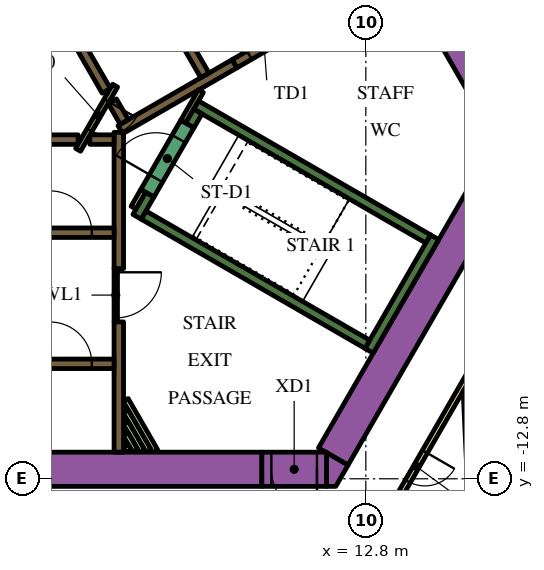
"""IFC4 building model, lengths in metres.
Left out: names, types, materials, properties, quantities, classifications, styles, units other than length and angle.
Written with IfcOpenShell. Run it as: python <this file> out.ifc"""

import sys

from ifc_helpers import new_model, si_unit, direction, frame, frame_2d, origin, place, context, subcontext, project, spatial, polyline, rectangle, outline, extrude, element, fill, save


model = new_model("IFC4")
c1 = context("Model", 3, precision=1e-05, world=origin(), true_north=direction((0.0, 1.0)))
c2 = subcontext(c1, "Body", "Model", "MODEL_VIEW")
j1 = project(units=[si_unit("LENGTHUNIT", "METRE"), si_unit("PLANEANGLEUNIT", "RADIAN")], contexts=[c1])
p1 = place(None, origin())
s1 = spatial("IfcSite", under=j1, at=p1, CompositionType="ELEMENT")
p2 = place(p1, origin())
s2 = spatial("IfcBuilding", under=s1, at=p2, CompositionType="ELEMENT")
p3 = place(p2, frame((0.0, 0.0, 47.1)))
s3 = spatial("IfcBuildingStorey", under=s2, at=p3, CompositionType="ELEMENT", Elevation=47.1)
p4 = place(p3, frame((6.776, 13.364, 0.0), z_axis=(0.0, 0.0, 1.0), x_axis=(0.500004177138, -0.8660229921, 0.0)))
e1 = element("IfcWall", 1, at=p4, inside=s3, PredefinedType="SOLIDWALL", context=c2, shape_type="SweptSolid", body=[
    extrude(rectangle(XDim=20.204, YDim=0.9, at=frame_2d((10.102, 0.0))), origin(), (0.0, 0.0, 1.0), 3.9),
])
p5 = place(p3, frame((11.943, -12.214, 0.0), z_axis=(0.0, 0.0, 1.0), x_axis=(0.49998092645, 0.866036415623, 0.0)))
e2 = element("IfcWall", 2, at=p5, inside=s3, PredefinedType="SOLIDWALL", context=c2, shape_type="SweptSolid", body=[
    extrude(rectangle(XDim=8.83, YDim=0.9, at=frame_2d((4.415, 0.0))), origin(), (0.0, 0.0, 1.0), 3.9),
])
p6 = place(p3, origin())
e3 = element("IfcWall", 3, at=p6, inside=s3, PredefinedType="SOLIDWALL", context=c2, shape_type="SweptSolid", body=[
    extrude(outline(polyline([(12.009, -13.0), (11.764, -13.0), (11.764, -12.113), (12.332, -12.441), (12.009, -13.0)])), origin(), (0.0, 0.0, 1.0), 3.9),
])
p7 = place(p3, frame((-12.019, -12.55, 0.0), z_axis=(0.0, 0.0, 1.0), x_axis=(1.0, 0.0, 0.0)))
e4 = element("IfcWall", 4, at=p7, inside=s3, PredefinedType="SOLIDWALL", context=c2, shape_type="SweptSolid", body=[
    extrude(rectangle(XDim=22.083, YDim=0.9, at=frame_2d((11.042, 0.0))), origin(), (0.0, 0.0, 1.0), 3.9),
])
p8 = place(p3, frame((12.885, -9.431, 0.0), z_axis=(0.0, 0.0, 1.0), x_axis=(0.500020560727, 0.866013532718, 0.0)))
e5 = element("IfcWall", 5, at=p8, inside=s3, PredefinedType="SOLIDWALL", context=c2, shape_type="SweptSolid", body=[
    extrude(rectangle(XDim=3.45, YDim=0.25, at=frame_2d((1.725, 0.0))), origin(), (0.0, 0.0, 1.0), 3.9),
])
p9 = place(p3, frame((12.84, -9.261, 0.0), z_axis=(0.0, 0.0, 1.0), x_axis=(-0.866013990052, 0.500019768644, 0.0)))
e6 = element("IfcWall", 6, at=p9, inside=s3, PredefinedType="SOLIDWALL", context=c2, shape_type="SweptSolid", body=[
    extrude(rectangle(XDim=6.8, YDim=0.25, at=frame_2d((3.4, 0.0))), origin(), (0.0, 0.0, 1.0), 3.9),
])
p10 = place(p3, frame((6.78, -5.906, 0.0), z_axis=(0.0, 0.0, 1.0), x_axis=(0.500223362819, 0.865896406789, 0.0)))
e7 = element("IfcWall", 7, at=p10, inside=s3, PredefinedType="SOLIDWALL", context=c2, shape_type="SweptSolid", body=[
    extrude(rectangle(XDim=0.675, YDim=0.25, at=frame_2d((0.337, 0.0))), origin(), (0.0, 0.0, 1.0), 3.9),
])
p11 = place(p3, frame((8.334, -2.964, 0.0), z_axis=(0.0, 0.0, 1.0), x_axis=(0.866016039709, -0.500016218704, 0.0)))
e8 = element("IfcWall", 8, at=p11, inside=s3, PredefinedType="SOLIDWALL", context=c2, shape_type="SweptSolid", body=[
    extrude(rectangle(XDim=7.05, YDim=0.25, at=frame_2d((3.525, 0.0))), origin(), (0.0, 0.0, 1.0), 3.9),
])
p12 = place(p3, frame((8.168, -3.503, 0.0), z_axis=(0.0, 0.0, 1.0), x_axis=(0.49972245349, 0.866185586049, 0.0)))
e9 = element("IfcWall", 9, at=p12, inside=s3, PredefinedType="SOLIDWALL", context=c2, shape_type="SweptSolid", body=[
    extrude(rectangle(XDim=0.425, YDim=0.25, at=frame_2d((0.212, 0.0))), origin(), (0.0, 0.0, 1.0), 3.9),
])
p13 = place(p3, frame((-5.259, -3.875, 0.0), z_axis=(0.0, 0.0, 1.0), x_axis=(1.0, 0.0, 0.0)))
e10 = element("IfcWall", 10, at=p13, inside=s3, PredefinedType="SOLIDWALL", context=c2, shape_type="SweptSolid", body=[
    extrude(rectangle(XDim=10.489, YDim=0.25, at=frame_2d((5.244, 0.0))), origin(), (0.0, 0.0, 1.0), 3.9),
])
p14 = place(p3, frame((6.3, -7.27, 0.0), z_axis=(0.0, 0.0, 1.0), x_axis=(0.0, 1.0, 0.0)))
e11 = element("IfcWall", 11, at=p14, inside=s3, PredefinedType="SOLIDWALL", context=c2, shape_type="SweptSolid", body=[
    extrude(rectangle(XDim=3.586, YDim=0.25, at=frame_2d((1.793, 0.0))), origin(), (0.0, 0.0, 1.0), 3.9),
])
p15 = place(p3, frame((6.3, -12.1, 0.0), z_axis=(0.0, 0.0, 1.0), x_axis=(0.0, 1.0, 0.0)))
e12 = element("IfcWall", 12, at=p15, inside=s3, PredefinedType="SOLIDWALL", context=c2, shape_type="SweptSolid", body=[
    extrude(rectangle(XDim=3.428, YDim=0.25, at=frame_2d((1.714, 0.0))), origin(), (0.0, 0.0, 1.0), 3.9),
])
p16 = place(p3, frame((5.538, -3.875, 0.0), z_axis=(0.0, 0.0, 1.0), x_axis=(1.0, 0.0, 0.0)))
e13 = element("IfcWall", 13, at=p16, inside=s3, PredefinedType="SOLIDWALL", context=c2, shape_type="SweptSolid", body=[
    extrude(rectangle(XDim=0.637, YDim=0.25, at=frame_2d((0.318, 0.0))), origin(), (0.0, 0.0, 1.0), 3.9),
])
p17 = place(p3, frame((9.346, -1.879, 0.0), z_axis=(0.0, 0.0, 1.0), x_axis=(-0.866048528039, -0.499959945477, 0.0)))
e14 = element("IfcWall", 14, at=p17, inside=s3, PredefinedType="SOLIDWALL", context=c2, shape_type="SweptSolid", body=[
    extrude(rectangle(XDim=3.47, YDim=0.25, at=frame_2d((1.735, 0.0))), origin(), (0.0, 0.0, 1.0), 3.9),
])
p18 = place(p3, frame((6.13, -2.867, 0.0), z_axis=(0.0, 0.0, 1.0), x_axis=(0.500160776593, -0.865932559475, 0.0)))
e15 = element("IfcWall", 15, at=p18, inside=s3, PredefinedType="SOLIDWALL", context=c2, shape_type="SweptSolid", body=[
    extrude(rectangle(XDim=0.627, YDim=0.25, at=frame_2d((0.313, 0.0))), origin(), (0.0, 0.0, 1.0), 3.9),
])
p19 = place(p3, frame((5.97, -2.591, 0.0), z_axis=(0.0, 0.0, 1.0), x_axis=(-0.499994469932, 0.866028596547, 0.0)))
e16 = element("IfcWall", 16, at=p19, inside=s3, PredefinedType="SOLIDWALL", context=c2, shape_type="SweptSolid", body=[
    extrude(rectangle(XDim=10.488, YDim=0.25, at=frame_2d((5.244, 0.0))), origin(), (0.0, 0.0, 1.0), 3.9),
])
p20 = place(p3, frame((6.48, -10.726, 0.0), z_axis=(0.0, 0.0, 1.0), x_axis=(0.500017819788, -0.86601511528, 0.0)))
e17 = element("IfcWall", 17, at=p20, inside=s3, PredefinedType="PARTITIONING", context=c2, shape_type="SweptSolid", body=[
    extrude(rectangle(XDim=1.55, YDim=0.15, at=frame_2d((0.775, 0.0))), origin(), (0.0, 0.0, 1.0), 2.75),
])
p21 = place(p3, frame((6.48, -11.026, 0.0), z_axis=(0.0, 0.0, 1.0), x_axis=(0.49995654735, -0.86605048973, 0.0)))
e18 = element("IfcWall", 18, at=p21, inside=s3, PredefinedType="PARTITIONING", context=c2, shape_type="SweptSolid", body=[
    extrude(rectangle(XDim=1.204, YDim=0.15, at=frame_2d((0.602, 0.0))), origin(), (0.0, 0.0, 1.0), 2.75),
])
p22 = place(p3, frame((6.48, -11.326, 0.0), z_axis=(0.0, 0.0, 1.0), x_axis=(0.500059337743, -0.865991142412, 0.0)))
e19 = element("IfcWall", 19, at=p22, inside=s3, PredefinedType="PARTITIONING", context=c2, shape_type="SweptSolid", body=[
    extrude(rectangle(XDim=0.857, YDim=0.15, at=frame_2d((0.429, 0.0))), origin(), (0.0, 0.0, 1.0), 2.75),
])
p23 = place(p3, frame((6.48, -11.626, 0.0), z_axis=(0.0, 0.0, 1.0), x_axis=(0.500301480982, -0.865851273677, 0.0)))
e20 = element("IfcWall", 20, at=p23, inside=s3, PredefinedType="PARTITIONING", context=c2, shape_type="SweptSolid", body=[
    extrude(rectangle(XDim=0.511, YDim=0.15, at=frame_2d((0.255, 0.0))), origin(), (0.0, 0.0, 1.0), 2.75),
])
p24 = place(p3, frame((6.48, -11.926, 0.0), z_axis=(0.0, 0.0, 1.0), x_axis=(0.500450775723, -0.86576499183, 0.0)))
e21 = element("IfcWall", 21, at=p24, inside=s3, PredefinedType="PARTITIONING", context=c2, shape_type="SweptSolid", body=[
    extrude(rectangle(XDim=0.164, YDim=0.15, at=frame_2d((0.082, 0.0))), origin(), (0.0, 0.0, 1.0), 2.75),
])
p25 = place(p3, frame((6.945, -5.222, 0.0), z_axis=(0.0, 0.0, 1.0), x_axis=(-0.499818422106, -0.866130212453, 0.0)))
e22 = element("IfcWall", 22, at=p25, inside=s3, PredefinedType="PARTITIONING", context=c2, shape_type="SweptSolid", body=[
    extrude(rectangle(XDim=0.514, YDim=0.15, at=frame_2d((0.257, 0.0))), origin(), (0.0, 0.0, 1.0), 2.75),
])
p26 = place(p3, frame((8.459, -2.599, 0.0), z_axis=(0.0, 0.0, 1.0), x_axis=(-0.500041054325, -0.866001699761, 0.0)))
e23 = element("IfcWall", 23, at=p26, inside=s3, PredefinedType="PARTITIONING", context=c2, shape_type="SweptSolid", body=[
    extrude(rectangle(XDim=0.929, YDim=0.15, at=frame_2d((0.464, 0.0))), origin(), (0.0, 0.0, 1.0), 3.9),
])
p27 = place(p3, frame((-6.175, -9.775, 0.0), z_axis=(0.0, 0.0, 1.0), x_axis=(1.0, 0.0, 0.0)))
e24 = element("IfcWall", 24, at=p27, inside=s3, PredefinedType="SOLIDWALL", context=c2, shape_type="SweptSolid", body=[
    extrude(rectangle(XDim=12.35, YDim=0.25, at=frame_2d((6.175, 0.0))), origin(), (0.0, 0.0, 1.0), 3.9),
])
p28 = place(p27, frame((0.585, 0.0, 0.0)))
e25 = element("IfcOpeningElement", 25, at=p28, cuts=e24, PredefinedType="OPENING", context=c2, shape_type="SweptSolid", body=[
    extrude(rectangle(XDim=1.1, YDim=2.1, at=frame_2d((0.55, 1.05))), frame((0.0, 0.135, 0.0), z_axis=(0.0, -1.0, 0.0), x_axis=(1.0, 0.0, 0.0)), (0.0, 0.0, 1.0), 0.27),
])
p29 = place(p27, frame((3.105, 0.0, 0.0)))
e26 = element("IfcOpeningElement", 26, at=p29, cuts=e24, PredefinedType="OPENING", context=c2, shape_type="SweptSolid", body=[
    extrude(rectangle(XDim=1.1, YDim=2.1, at=frame_2d((0.55, 1.05))), frame((0.0, 0.135, 0.0), z_axis=(0.0, -1.0, 0.0), x_axis=(1.0, 0.0, 0.0)), (0.0, 0.0, 1.0), 0.27),
])
p30 = place(p27, frame((5.625, 0.0, 0.0)))
e27 = element("IfcOpeningElement", 27, at=p30, cuts=e24, PredefinedType="OPENING", context=c2, shape_type="SweptSolid", body=[
    extrude(rectangle(XDim=1.1, YDim=2.1, at=frame_2d((0.55, 1.05))), frame((0.0, 0.135, 0.0), z_axis=(0.0, -1.0, 0.0), x_axis=(1.0, 0.0, 0.0)), (0.0, 0.0, 1.0), 0.27),
])
p31 = place(p27, frame((8.145, 0.0, 0.0)))
e28 = element("IfcOpeningElement", 28, at=p31, cuts=e24, PredefinedType="OPENING", context=c2, shape_type="SweptSolid", body=[
    extrude(rectangle(XDim=1.1, YDim=2.1, at=frame_2d((0.55, 1.05))), frame((0.0, 0.135, 0.0), z_axis=(0.0, -1.0, 0.0), x_axis=(1.0, 0.0, 0.0)), (0.0, 0.0, 1.0), 0.27),
])
p32 = place(p27, frame((10.665, 0.0, 0.0)))
e29 = element("IfcOpeningElement", 29, at=p32, cuts=e24, PredefinedType="OPENING", context=c2, shape_type="SweptSolid", body=[
    extrude(rectangle(XDim=1.1, YDim=2.1, at=frame_2d((0.55, 1.05))), frame((0.0, 0.135, 0.0), z_axis=(0.0, -1.0, 0.0), x_axis=(1.0, 0.0, 0.0)), (0.0, 0.0, 1.0), 0.27),
])
p33 = place(p3, frame((-6.175, -6.325, 0.0), z_axis=(0.0, 0.0, 1.0), x_axis=(1.0, 0.0, 0.0)))
e30 = element("IfcWall", 30, at=p33, inside=s3, PredefinedType="SOLIDWALL", context=c2, shape_type="SweptSolid", body=[
    extrude(rectangle(XDim=12.35, YDim=0.25, at=frame_2d((6.175, 0.0))), origin(), (0.0, 0.0, 1.0), 3.9),
])
p34 = place(p33, frame((3.205, 0.0, 0.0)))
e31 = element("IfcOpeningElement", 31, at=p34, cuts=e30, PredefinedType="OPENING", context=c2, shape_type="SweptSolid", body=[
    extrude(rectangle(XDim=0.9, YDim=2.1, at=frame_2d((0.45, 1.05))), frame((0.0, 0.135, 0.0), z_axis=(0.0, -1.0, 0.0), x_axis=(1.0, 0.0, 0.0)), (0.0, 0.0, 1.0), 0.27),
])
p35 = place(p33, frame((8.145, 0.0, 0.0)))
e32 = element("IfcOpeningElement", 32, at=p35, cuts=e30, PredefinedType="OPENING", context=c2, shape_type="SweptSolid", body=[
    extrude(rectangle(XDim=1.1, YDim=2.1, at=frame_2d((0.55, 1.05))), frame((0.0, 0.135, 0.0), z_axis=(0.0, -1.0, 0.0), x_axis=(1.0, 0.0, 0.0)), (0.0, 0.0, 1.0), 0.27),
])
p36 = place(p33, frame((10.665, 0.0, 0.0)))
e33 = element("IfcOpeningElement", 33, at=p36, cuts=e30, PredefinedType="OPENING", context=c2, shape_type="SweptSolid", body=[
    extrude(rectangle(XDim=1.1, YDim=2.1, at=frame_2d((0.55, 1.05))), frame((0.0, 0.135, 0.0), z_axis=(0.0, -1.0, 0.0), x_axis=(1.0, 0.0, 0.0)), (0.0, 0.0, 1.0), 0.27),
])
p37 = place(p3, frame((8.565, -2.185, 0.0), z_axis=(0.0, 0.0, 1.0), x_axis=(-0.499997954832, 0.866026584559, 0.0)))
e34 = element("IfcWall", 34, at=p37, inside=s3, PredefinedType="SOLIDWALL", context=c2, shape_type="SweptSolid", body=[
    extrude(rectangle(XDim=12.35, YDim=0.25, at=frame_2d((6.175, 0.0))), origin(), (0.0, 0.0, 1.0), 3.9),
])
p38 = place(p37, frame((5.725, 0.0, 0.0)))
e35 = element("IfcOpeningElement", 35, at=p38, cuts=e34, PredefinedType="OPENING", context=c2, shape_type="SweptSolid", body=[
    extrude(rectangle(XDim=0.9, YDim=2.1, at=frame_2d((0.45, 1.05))), frame((0.0, 0.135, 0.0), z_axis=(0.0, -1.0, 0.0), x_axis=(1.0, 0.0, 0.0)), (0.0, 0.0, 1.0), 0.27),
])
p39 = place(p3, frame((7.053, -5.284, 0.0), z_axis=(0.0, 0.0, 1.0), x_axis=(0.500078061341, 0.865980330357, 0.0)))
e36 = element("IfcWall", 36, at=p39, inside=s3, PredefinedType="SOLIDWALL", context=c2, shape_type="SweptSolid", body=[
    extrude(rectangle(XDim=2.1, YDim=0.4, at=frame_2d((1.05, 0.0))), origin(), (0.0, 0.0, 1.0), 3.9),
])
p40 = place(p39, frame((0.45, 0.0, 0.0)))
e37 = element("IfcOpeningElement", 37, at=p40, cuts=e36, PredefinedType="OPENING", context=c2, shape_type="SweptSolid", body=[
    extrude(rectangle(XDim=1.2, YDim=2.1, at=frame_2d((0.6, 1.05))), frame((0.0, 0.21, 0.0), z_axis=(0.0, -1.0, 0.0), x_axis=(1.0, 0.0, 0.0)), (0.0, 0.0, 1.0), 0.42),
])
p41 = place(p3, frame((9.346, -1.879, 0.0), z_axis=(0.0, 0.0, 1.0), x_axis=(0.866047807691, 0.499961193289, 0.0)))
e38 = element("IfcWall", 38, at=p41, inside=s3, PredefinedType="SOLIDWALL", context=c2, shape_type="SweptSolid", body=[
    extrude(rectangle(XDim=1.8, YDim=0.25, at=frame_2d((0.9, 0.0))), origin(), (0.0, 0.0, 1.0), 3.9),
])
p42 = place(p41, frame((0.45, 0.0, 0.0)))
e39 = element("IfcOpeningElement", 39, at=p42, cuts=e38, PredefinedType="OPENING", context=c2, shape_type="SweptSolid", body=[
    extrude(rectangle(XDim=0.9, YDim=2.1, at=frame_2d((0.45, 1.05))), frame((0.0, 0.135, 0.0), z_axis=(0.0, -1.0, 0.0), x_axis=(1.0, 0.0, 0.0)), (0.0, 0.0, 1.0), 0.27),
])
p43 = place(p3, frame((6.203, -2.456, 0.0), z_axis=(0.0, 0.0, 1.0), x_axis=(-0.500043961785, -0.866000020948, 0.0)))
e40 = element("IfcWall", 40, at=p43, inside=s3, PredefinedType="PARTITIONING", context=c2, shape_type="SweptSolid", body=[
    extrude(rectangle(XDim=1.95, YDim=0.15, at=frame_2d((0.975, 0.0))), origin(), (0.0, 0.0, 1.0), 3.9),
])
p44 = place(p43, frame((0.45, 0.0, 0.0)))
e41 = element("IfcOpeningElement", 41, at=p44, cuts=e40, PredefinedType="OPENING", context=c2, shape_type="SweptSolid", body=[
    extrude(rectangle(XDim=0.9, YDim=2.1, at=frame_2d((0.45, 1.05))), frame((0.0, 0.085, 0.0), z_axis=(0.0, -1.0, 0.0), x_axis=(1.0, 0.0, 0.0)), (0.0, 0.0, 1.0), 0.17),
])
p45 = place(p3, frame((6.22, -7.266, 0.0), z_axis=(0.0, 0.0, 1.0), x_axis=(0.0, -1.0, 0.0)))
e42 = element("IfcWall", 42, at=p45, inside=s3, PredefinedType="PARTITIONING", context=c2, shape_type="SweptSolid", body=[
    extrude(rectangle(XDim=1.4, YDim=0.09, at=frame_2d((0.7, 0.0))), origin(), (0.0, 0.0, 1.0), 2.75),
])
p46 = place(p45, frame((0.1, 0.0, 0.0)))
e43 = element("IfcOpeningElement", 43, at=p46, cuts=e42, PredefinedType="OPENING", context=c2, shape_type="SweptSolid", body=[
    extrude(rectangle(XDim=1.2, YDim=2.1, at=frame_2d((0.6, 1.05))), frame((0.0, 0.055, 0.0), z_axis=(0.0, -1.0, 0.0), x_axis=(1.0, 0.0, 0.0)), (0.0, 0.0, 1.0), 0.11),
])
p47 = place(p3, frame((11.764, -12.55, 0.0), z_axis=(0.0, 0.0, 1.0), x_axis=(-1.0, 0.0, 0.0)))
e44 = element("IfcWall", 44, at=p47, inside=s3, PredefinedType="SOLIDWALL", context=c2, shape_type="SweptSolid", body=[
    extrude(rectangle(XDim=1.7, YDim=0.9, at=frame_2d((0.85, 0.0))), origin(), (0.0, 0.0, 1.0), 3.9),
])
p48 = place(p47, frame((0.25, 0.0, 0.0)))
e45 = element("IfcOpeningElement", 45, at=p48, cuts=e44, PredefinedType="OPENING", context=c2, shape_type="SweptSolid", body=[
    extrude(rectangle(XDim=1.2, YDim=2.1, at=frame_2d((0.6, 1.05))), frame((0.0, 0.46, 0.0), z_axis=(0.0, -1.0, 0.0), x_axis=(1.0, 0.0, 0.0)), (0.0, 0.0, 1.0), 0.92),
])
p49 = place(p3, frame((6.163, 18.475, 0.0), z_axis=(0.0, 0.0, 1.0), x_axis=(0.500001317485, -0.866024643133, 0.0)))
e46 = element("IfcWall", 46, at=p49, inside=s3, PredefinedType="PARTITIONING", context=c2, shape_type="SweptSolid", body=[
    extrude(rectangle(XDim=25.767, YDim=0.15, at=frame_2d((12.883, 0.0))), origin(), (0.0, 0.0, 1.0), 2.75),
])
p50 = place(p49, frame((24.586, 0.0, 0.0)))
e47 = element("IfcOpeningElement", 47, at=p50, cuts=e46, PredefinedType="OPENING", context=c2, shape_type="SweptSolid", body=[
    extrude(rectangle(XDim=1.0, YDim=2.1, at=frame_2d((0.5, 1.05))), frame((0.0, 0.085, 0.0), z_axis=(0.0, -1.0, 0.0), x_axis=(1.0, 0.0, 0.0)), (0.0, 0.0, 1.0), 0.17),
])
p51 = place(p49, frame((16.196, 0.0, 0.0)))
e48 = element("IfcOpeningElement", 48, at=p51, cuts=e46, PredefinedType="OPENING", context=c2, shape_type="SweptSolid", body=[
    extrude(rectangle(XDim=1.0, YDim=2.1, at=frame_2d((0.5, 1.05))), frame((0.0, 0.085, 0.0), z_axis=(0.0, -1.0, 0.0), x_axis=(1.0, 0.0, 0.0)), (0.0, 0.0, 1.0), 0.17),
])
p52 = place(p49, frame((14.789, 0.0, 0.0)))
e49 = element("IfcOpeningElement", 49, at=p52, cuts=e46, PredefinedType="OPENING", context=c2, shape_type="SweptSolid", body=[
    extrude(rectangle(XDim=1.1, YDim=2.1, at=frame_2d((0.55, 1.05))), frame((0.0, 0.085, 0.0), z_axis=(0.0, -1.0, 0.0), x_axis=(1.0, 0.0, 0.0)), (0.0, 0.0, 1.0), 0.17),
])
p53 = place(p49, frame((3.698, 0.0, 0.0)))
e50 = element("IfcOpeningElement", 50, at=p53, cuts=e46, PredefinedType="OPENING", context=c2, shape_type="SweptSolid", body=[
    extrude(rectangle(XDim=1.0, YDim=2.1, at=frame_2d((0.5, 1.05))), frame((0.0, 0.085, 0.0), z_axis=(0.0, -1.0, 0.0), x_axis=(1.0, 0.0, 0.0)), (0.0, 0.0, 1.0), 0.17),
])
p54 = place(p49, frame((2.391, 0.0, 0.0)))
e51 = element("IfcOpeningElement", 51, at=p54, cuts=e46, PredefinedType="OPENING", context=c2, shape_type="SweptSolid", body=[
    extrude(rectangle(XDim=1.0, YDim=2.1, at=frame_2d((0.5, 1.05))), frame((0.0, 0.085, 0.0), z_axis=(0.0, -1.0, 0.0), x_axis=(1.0, 0.0, 0.0)), (0.0, 0.0, 1.0), 0.17),
])
p55 = place(p3, frame((15.587, -9.952, 0.0), z_axis=(0.0, 0.0, 1.0), x_axis=(-0.500016618951, -0.866015808616, 0.0)))
e52 = element("IfcWall", 52, at=p55, inside=s3, PredefinedType="PARTITIONING", context=c2, shape_type="SweptSolid", body=[
    extrude(rectangle(XDim=5.268, YDim=0.15, at=frame_2d((2.634, 0.0))), origin(), (0.0, 0.0, 1.0), 2.75),
])
p56 = place(p55, frame((2.465, 0.0, 0.0)))
e53 = element("IfcOpeningElement", 53, at=p56, cuts=e52, PredefinedType="OPENING", context=c2, shape_type="SweptSolid", body=[
    extrude(rectangle(XDim=0.9, YDim=2.1, at=frame_2d((0.45, 1.05))), frame((0.0, 0.085, 0.0), z_axis=(0.0, -1.0, 0.0), x_axis=(1.0, 0.0, 0.0)), (0.0, 0.0, 1.0), 0.17),
])
p57 = place(p3, frame((15.973, -22.109, 0.0), z_axis=(0.0, 0.0, 1.0), x_axis=(-0.046191717129, 0.998932592955, 0.0)))
e54 = element("IfcWall", 54, at=p57, inside=s3, PredefinedType="PARTITIONING", context=c2, shape_type="SweptSolid", body=[
    extrude(rectangle(XDim=11.638, YDim=0.15, at=frame_2d((5.819, 0.0))), origin(), (0.0, 0.0, 1.0), 2.75),
])
p58 = place(p32, origin())
e55 = element("IfcDoor", 55, at=p58, inside=s3, OperationType="DOUBLE_DOOR_SLIDING", PredefinedType="DOOR", context=c2, shape_type="SweptSolid", body=[
    extrude(rectangle(XDim=1.1, YDim=2.1, at=frame_2d((0.55, 1.05))), frame((0.0, 0.025, 0.0), z_axis=(0.0, -1.0, 0.0), x_axis=(1.0, 0.0, 0.0)), (0.0, 0.0, 1.0), 0.05),
])
fill(e29, e55)
p59 = place(p36, origin())
e56 = element("IfcDoor", 56, at=p59, inside=s3, OperationType="DOUBLE_DOOR_SLIDING", PredefinedType="DOOR", context=c2, shape_type="SweptSolid", body=[
    extrude(rectangle(XDim=1.1, YDim=2.1, at=frame_2d((0.55, 1.05))), frame((0.0, 0.025, 0.0), z_axis=(0.0, -1.0, 0.0), x_axis=(1.0, 0.0, 0.0)), (0.0, 0.0, 1.0), 0.05),
])
fill(e33, e56)
p60 = place(p40, origin())
e57 = element("IfcDoor", 57, at=p60, inside=s3, OperationType="SINGLE_SWING_LEFT", PredefinedType="DOOR", context=c2, shape_type="SweptSolid", body=[
    extrude(rectangle(XDim=1.2, YDim=2.1, at=frame_2d((0.6, 1.05))), frame((0.0, 0.025, 0.0), z_axis=(0.0, -1.0, 0.0), x_axis=(1.0, 0.0, 0.0)), (0.0, 0.0, 1.0), 0.05),
])
fill(e37, e57)
p61 = place(p42, origin())
e58 = element("IfcDoor", 58, at=p61, inside=s3, OperationType="SINGLE_SWING_LEFT", PredefinedType="DOOR", context=c2, shape_type="SweptSolid", body=[
    extrude(rectangle(XDim=0.9, YDim=2.1, at=frame_2d((0.45, 1.05))), frame((0.0, 0.025, 0.0), z_axis=(0.0, -1.0, 0.0), x_axis=(1.0, 0.0, 0.0)), (0.0, 0.0, 1.0), 0.05),
])
fill(e39, e58)
p62 = place(p44, origin())
e59 = element("IfcDoor", 59, at=p62, inside=s3, OperationType="SINGLE_SWING_LEFT", PredefinedType="DOOR", context=c2, shape_type="SweptSolid", body=[
    extrude(rectangle(XDim=0.9, YDim=2.1, at=frame_2d((0.45, 1.05))), frame((0.0, 0.025, 0.0), z_axis=(0.0, -1.0, 0.0), x_axis=(1.0, 0.0, 0.0)), (0.0, 0.0, 1.0), 0.05),
])
fill(e41, e59)
p63 = place(p46, origin())
e60 = element("IfcDoor", 60, at=p63, inside=s3, OperationType="SINGLE_SWING_LEFT", PredefinedType="DOOR", context=c2, shape_type="SweptSolid", body=[
    extrude(rectangle(XDim=1.2, YDim=2.1, at=frame_2d((0.6, 1.05))), frame((0.0, 0.025, 0.0), z_axis=(0.0, -1.0, 0.0), x_axis=(1.0, 0.0, 0.0)), (0.0, 0.0, 1.0), 0.05),
])
fill(e43, e60)
p64 = place(p48, origin())
e61 = element("IfcDoor", 61, at=p64, inside=s3, OperationType="SINGLE_SWING_LEFT", PredefinedType="DOOR", context=c2, shape_type="SweptSolid", body=[
    extrude(rectangle(XDim=1.2, YDim=2.1, at=frame_2d((0.6, 1.05))), frame((0.0, 0.025, 0.0), z_axis=(0.0, -1.0, 0.0), x_axis=(1.0, 0.0, 0.0)), (0.0, 0.0, 1.0), 0.05),
])
fill(e45, e61)
p65 = place(p56, origin())
e62 = element("IfcDoor", 62, at=p65, inside=s3, OperationType="SINGLE_SWING_LEFT", PredefinedType="DOOR", context=c2, shape_type="SweptSolid", body=[
    extrude(rectangle(XDim=0.9, YDim=2.1, at=frame_2d((0.45, 1.05))), frame((0.0, 0.025, 0.0), z_axis=(0.0, -1.0, 0.0), x_axis=(1.0, 0.0, 0.0)), (0.0, 0.0, 1.0), 0.05),
])
fill(e53, e62)
save(model, sys.argv[1])
